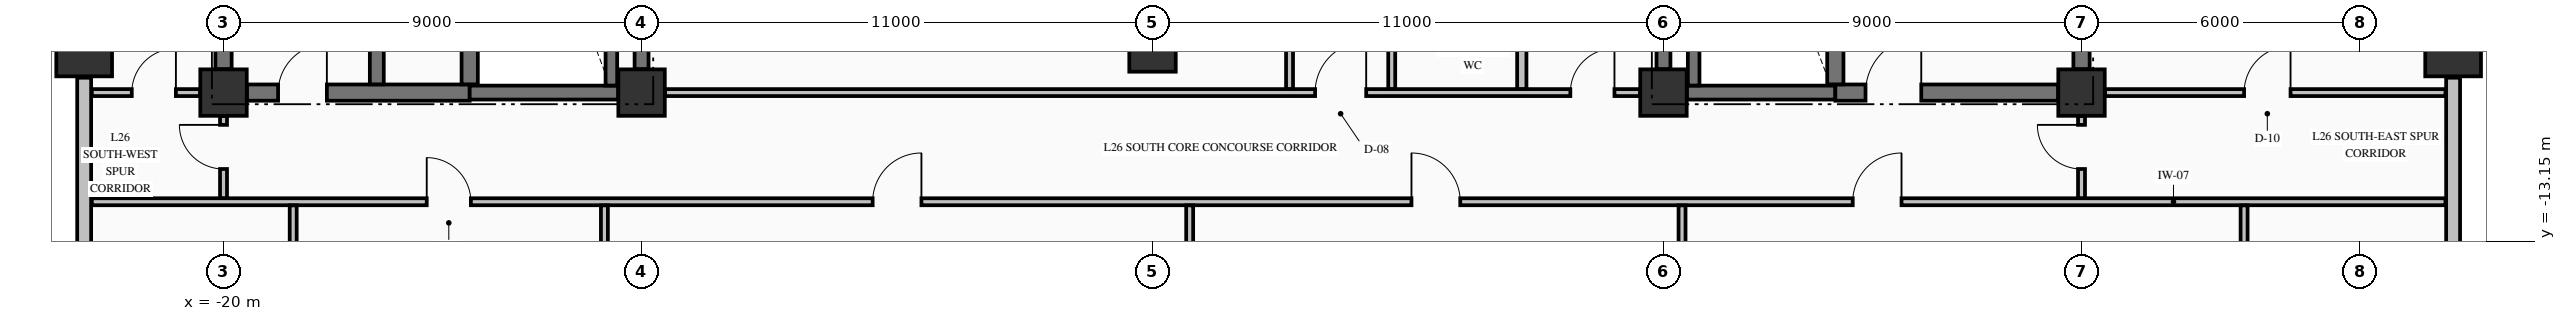
"""IFC4 building model, lengths in metres.
Left out: names, types, materials, properties, quantities, classifications, styles, units other than length and angle.
Written with IfcOpenShell. Run it as: python <this file> out.ifc"""

import sys

from ifc_helpers import new_model, si_unit, direction, frame, frame_2d, origin, origin_2d, place, context, subcontext, project, spatial, rectangle, extrude, element, fill, save


model = new_model("IFC4")
c1 = context("Model", 3, precision=1e-05, world=origin(), true_north=direction((0.0, 1.0)))
c2 = subcontext(c1, "Body", "Model", "MODEL_VIEW")
j1 = project(units=[si_unit("LENGTHUNIT", "METRE"), si_unit("PLANEANGLEUNIT", "RADIAN")], contexts=[c1])
p1 = place(None, origin())
s1 = spatial("IfcSite", under=j1, at=p1, CompositionType="ELEMENT")
p2 = place(p1, origin())
s2 = spatial("IfcBuilding", under=s1, at=p2, CompositionType="ELEMENT")
p3 = place(p2, frame((0.0, 0.0, 105.64)))
s3 = spatial("IfcBuildingStorey", under=s2, at=p3, CompositionType="ELEMENT", Elevation=105.64)
for number, where, z_axis, x_axis in (
    (1, (-23.0, -9.0, -0.25), (0.0, 0.0, 1.0), (1.0, 0.0, 0.0)),
    (2, (28.0, -9.0, -0.25), (0.0, 0.0, 1.0), (1.0, 0.0, 0.0)),
):
    element("IfcColumn", number, at=place(p3, frame(where, z_axis=z_axis, x_axis=x_axis)), inside=s3, PredefinedType="COLUMN", context=c2, shape_type="SweptSolid", body=[
        extrude(rectangle(XDim=1.2, YDim=1.2, at=origin_2d()), origin(), (0.0, 0.0, 1.0), 3.57),
    ])
for number, where, z_axis, x_axis in (
    (3, (-20.0, -9.95, -0.25), (0.0, 0.0, 1.0), (1.0, 0.0, 0.0)),
    (4, (-11.0, -9.95, -0.25), (0.0, 0.0, 1.0), (1.0, 0.0, 0.0)),
    (5, (11.0, -9.95, -0.25), (0.0, 0.0, 1.0), (1.0, 0.0, 0.0)),
    (6, (20.0, -9.95, -0.25), (0.0, 0.0, 1.0), (1.0, 0.0, 0.0)),
    (7, (0.0, -9.0, -0.25), (0.0, 0.0, 1.0), (1.0, 0.0, 0.0)),
):
    element("IfcColumn", number, at=place(p3, frame(where, z_axis=z_axis, x_axis=x_axis)), inside=s3, PredefinedType="COLUMN", context=c2, shape_type="SweptSolid", body=[
        extrude(rectangle(XDim=1.0, YDim=1.0, at=origin_2d()), origin(), (0.0, 0.0, 1.0), 3.57),
    ])
for number, where, z_axis, x_axis in (
    (8, (28.0, -20.37, 0.0), (0.0, 0.0, 1.0), (0.0, 1.0, 0.0)),
    (9, (-23.0, -9.63, 0.0), (0.0, 0.0, 1.0), (0.0, -1.0, 0.0)),
):
    element("IfcWall", number, at=place(p3, frame(where, z_axis=z_axis, x_axis=x_axis)), inside=s3, PredefinedType="STANDARD", context=c2, shape_type="SweptSolid", body=[
        extrude(rectangle(XDim=10.74, YDim=0.3, at=frame_2d((5.37, 0.0))), origin(), (0.0, 0.0, 1.0), 2.712),
    ])
p4 = place(p3, frame((-19.496, -9.95, 0.0), z_axis=(0.0, 0.0, 1.0), x_axis=(1.0, 0.0, 0.0)))
e10 = element("IfcWall", 10, at=p4, inside=s3, PredefinedType="SHEAR", context=c2, shape_type="SweptSolid", body=[
    extrude(rectangle(XDim=4.796, YDim=0.35, at=frame_2d((2.398, 0.0))), origin(), (0.0, 0.0, 1.0), 3.32),
])
p5 = place(p4, frame((0.671, 0.0, 0.0)))
e11 = element("IfcOpeningElement", 11, at=p5, cuts=e10, PredefinedType="OPENING", context=c2, shape_type="SweptSolid", body=[
    extrude(rectangle(XDim=1.05, YDim=2.15, at=frame_2d((0.525, 1.075))), frame((0.0, 0.185, 0.0), z_axis=(0.0, -1.0, 0.0), x_axis=(1.0, 0.0, 0.0)), (0.0, 0.0, 1.0), 0.37),
])
for number, where, z_axis, x_axis in (
    (12, (-14.7, -9.95, 0.0), (0.0, 0.0, 1.0), (1.0, 0.0, 0.0)),
    (13, (11.504, -9.95, 0.0), (0.0, 0.0, 1.0), (1.0, 0.0, 0.0)),
):
    element("IfcWall", number, at=place(p3, frame(where, z_axis=z_axis, x_axis=x_axis)), inside=s3, PredefinedType="SHEAR", context=c2, shape_type="SweptSolid", body=[
        extrude(rectangle(XDim=3.196, YDim=0.3, at=frame_2d((1.598, 0.0))), origin(), (0.0, 0.0, 1.0), 3.32),
    ])
p6 = place(p3, frame((14.7, -9.95, 0.0), z_axis=(0.0, 0.0, 1.0), x_axis=(1.0, 0.0, 0.0)))
e14 = element("IfcWall", 14, at=p6, inside=s3, PredefinedType="SHEAR", context=c2, shape_type="SweptSolid", body=[
    extrude(rectangle(XDim=4.796, YDim=0.35, at=frame_2d((2.398, 0.0))), origin(), (0.0, 0.0, 1.0), 3.32),
])
p7 = place(p6, frame((0.65, 0.0, 0.0)))
e15 = element("IfcOpeningElement", 15, at=p7, cuts=e14, PredefinedType="OPENING", context=c2, shape_type="SweptSolid", body=[
    extrude(rectangle(XDim=1.2, YDim=2.15, at=frame_2d((0.6, 1.075))), frame((0.0, 0.185, 0.0), z_axis=(0.0, -1.0, 0.0), x_axis=(1.0, 0.0, 0.0)), (0.0, 0.0, 1.0), 0.37),
])
p8 = place(p3, frame((-22.835, -12.3, 0.0), z_axis=(0.0, 0.0, 1.0), x_axis=(1.0, 0.0, 0.0)))
e16 = element("IfcWall", 16, at=p8, inside=s3, PredefinedType="PARTITIONING", context=c2, shape_type="SweptSolid", body=[
    extrude(rectangle(XDim=50.67, YDim=0.15, at=frame_2d((25.335, 0.0))), origin(), (0.0, 0.0, 1.0), 3.32),
])
p9 = place(p8, frame((7.21, 0.0, 0.0)))
e17 = element("IfcOpeningElement", 17, at=p9, cuts=e16, PredefinedType="OPENING", context=c2, shape_type="SweptSolid", body=[
    extrude(rectangle(XDim=0.95, YDim=2.15, at=frame_2d((0.475, 1.075))), frame((0.0, 0.085, 0.0), z_axis=(0.0, -1.0, 0.0), x_axis=(1.0, 0.0, 0.0)), (0.0, 0.0, 1.0), 0.17),
])
p10 = place(p8, frame((16.81, 0.0, 0.0)))
e18 = element("IfcOpeningElement", 18, at=p10, cuts=e16, PredefinedType="OPENING", context=c2, shape_type="SweptSolid", body=[
    extrude(rectangle(XDim=1.05, YDim=2.15, at=frame_2d((0.525, 1.075))), frame((0.0, 0.085, 0.0), z_axis=(0.0, -1.0, 0.0), x_axis=(1.0, 0.0, 0.0)), (0.0, 0.0, 1.0), 0.17),
])
p11 = place(p8, frame((28.41, 0.0, 0.0)))
e19 = element("IfcOpeningElement", 19, at=p11, cuts=e16, PredefinedType="OPENING", context=c2, shape_type="SweptSolid", body=[
    extrude(rectangle(XDim=1.05, YDim=2.15, at=frame_2d((0.525, 1.075))), frame((0.0, 0.085, 0.0), z_axis=(0.0, -1.0, 0.0), x_axis=(1.0, 0.0, 0.0)), (0.0, 0.0, 1.0), 0.17),
])
p12 = place(p8, frame((37.91, 0.0, 0.0)))
e20 = element("IfcOpeningElement", 20, at=p12, cuts=e16, PredefinedType="OPENING", context=c2, shape_type="SweptSolid", body=[
    extrude(rectangle(XDim=1.05, YDim=2.15, at=frame_2d((0.525, 1.075))), frame((0.0, 0.085, 0.0), z_axis=(0.0, -1.0, 0.0), x_axis=(1.0, 0.0, 0.0)), (0.0, 0.0, 1.0), 0.17),
])
p13 = place(p3, frame((-22.835, -9.95, 0.0), z_axis=(0.0, 0.0, 1.0), x_axis=(1.0, 0.0, 0.0)))
e21 = element("IfcWall", 21, at=p13, inside=s3, PredefinedType="PARTITIONING", context=c2, shape_type="SweptSolid", body=[
    extrude(rectangle(XDim=2.329, YDim=0.15, at=frame_2d((1.165, 0.0))), origin(), (0.0, 0.0, 1.0), 3.32),
])
p14 = place(p13, frame((0.86, 0.0, 0.0)))
e22 = element("IfcOpeningElement", 22, at=p14, cuts=e21, PredefinedType="OPENING", context=c2, shape_type="SweptSolid", body=[
    extrude(rectangle(XDim=0.95, YDim=2.15, at=frame_2d((0.475, 1.075))), frame((0.0, 0.085, 0.0), z_axis=(0.0, -1.0, 0.0), x_axis=(1.0, 0.0, 0.0)), (0.0, 0.0, 1.0), 0.17),
])
p15 = place(p3, frame((-10.494, -9.95, 0.0), z_axis=(0.0, 0.0, 1.0), x_axis=(1.0, 0.0, 0.0)))
e23 = element("IfcWall", 23, at=p15, inside=s3, PredefinedType="PARTITIONING", context=c2, shape_type="SweptSolid", body=[
    extrude(rectangle(XDim=20.988, YDim=0.15, at=frame_2d((10.494, 0.0))), origin(), (0.0, 0.0, 1.0), 3.32),
])
p16 = place(p15, frame((13.994, 0.0, 0.0)))
e24 = element("IfcOpeningElement", 24, at=p16, cuts=e23, PredefinedType="OPENING", context=c2, shape_type="SweptSolid", body=[
    extrude(rectangle(XDim=1.1, YDim=2.15, at=frame_2d((0.55, 1.075))), frame((0.0, 0.085, 0.0), z_axis=(0.0, -1.0, 0.0), x_axis=(1.0, 0.0, 0.0)), (0.0, 0.0, 1.0), 0.17),
])
p17 = place(p15, frame((19.489, 0.0, 0.0)))
e25 = element("IfcOpeningElement", 25, at=p17, cuts=e23, PredefinedType="OPENING", context=c2, shape_type="SweptSolid", body=[
    extrude(rectangle(XDim=0.95, YDim=2.15, at=frame_2d((0.475, 1.075))), frame((0.0, 0.085, 0.0), z_axis=(0.0, -1.0, 0.0), x_axis=(1.0, 0.0, 0.0)), (0.0, 0.0, 1.0), 0.17),
])
p18 = place(p3, frame((20.506, -9.95, 0.0), z_axis=(0.0, 0.0, 1.0), x_axis=(1.0, 0.0, 0.0)))
e26 = element("IfcWall", 26, at=p18, inside=s3, PredefinedType="PARTITIONING", context=c2, shape_type="SweptSolid", body=[
    extrude(rectangle(XDim=7.329, YDim=0.15, at=frame_2d((3.665, 0.0))), origin(), (0.0, 0.0, 1.0), 3.32),
])
p19 = place(p18, frame((2.994, 0.0, 0.0)))
e27 = element("IfcOpeningElement", 27, at=p19, cuts=e26, PredefinedType="OPENING", context=c2, shape_type="SweptSolid", body=[
    extrude(rectangle(XDim=1.0, YDim=2.15, at=frame_2d((0.5, 1.075))), frame((0.0, 0.085, 0.0), z_axis=(0.0, -1.0, 0.0), x_axis=(1.0, 0.0, 0.0)), (0.0, 0.0, 1.0), 0.17),
])
p20 = place(p3, frame((-20.0, -9.446, 0.0), z_axis=(0.0, 0.0, 1.0), x_axis=(0.0, 1.0, 0.0)))
e28 = element("IfcWall", 28, at=p20, inside=s3, PredefinedType="SHEAR", context=c2, shape_type="SweptSolid", body=[
    extrude(rectangle(XDim=8.942, YDim=0.35, at=frame_2d((4.471, 0.0))), origin(), (0.0, 0.0, 1.0), 3.32),
])
p21 = place(p3, frame((-16.7, -9.773, 0.0), z_axis=(0.0, 0.0, 1.0), x_axis=(0.0, 1.0, 0.0)))
e29 = element("IfcWall", 29, at=p21, inside=s3, PredefinedType="SHEAR", context=c2, shape_type="SweptSolid", body=[
    extrude(rectangle(XDim=9.371, YDim=0.3, at=frame_2d((4.686, 0.0))), origin(), (0.0, 0.0, 1.0), 3.32),
])
p22 = place(p3, frame((-14.7, -9.773, 0.0), z_axis=(0.0, 0.0, 1.0), x_axis=(0.0, 1.0, 0.0)))
e30 = element("IfcWall", 30, at=p22, inside=s3, PredefinedType="SHEAR", context=c2, shape_type="SweptSolid", body=[
    extrude(rectangle(XDim=9.371, YDim=0.35, at=frame_2d((4.686, 0.0))), origin(), (0.0, 0.0, 1.0), 3.32),
])
p23 = place(p3, frame((-11.65, -9.798, 0.0), z_axis=(0.0, 0.0, 1.0), x_axis=(0.0, 1.0, 0.0)))
e31 = element("IfcWall", 31, at=p23, inside=s3, PredefinedType="SOLIDWALL", context=c2, shape_type="SweptSolid", body=[
    extrude(rectangle(XDim=9.396, YDim=0.25, at=frame_2d((4.698, 0.0))), origin(), (0.0, 0.0, 1.0), 3.32),
])
for number, where, z_axis, x_axis in (
    (32, (-11.0, -9.446, 0.0), (0.0, 0.0, 1.0), (0.0, 1.0, 0.0)),
    (33, (11.0, -9.446, 0.0), (0.0, 0.0, 1.0), (0.0, 1.0, 0.0)),
):
    element("IfcWall", number, at=place(p3, frame(where, z_axis=z_axis, x_axis=x_axis)), inside=s3, PredefinedType="SHEAR", context=c2, shape_type="SweptSolid", body=[
        extrude(rectangle(XDim=8.942, YDim=0.3, at=frame_2d((4.471, 0.0))), origin(), (0.0, 0.0, 1.0), 3.32),
    ])
p24 = place(p3, frame((11.65, -9.798, 0.0), z_axis=(0.0, 0.0, 1.0), x_axis=(0.0, 1.0, 0.0)))
e34 = element("IfcWall", 34, at=p24, inside=s3, PredefinedType="SOLIDWALL", context=c2, shape_type="SweptSolid", body=[
    extrude(rectangle(XDim=9.396, YDim=0.25, at=frame_2d((4.698, 0.0))), origin(), (0.0, 0.0, 1.0), 3.32),
])
p25 = place(p3, frame((14.7, -9.773, 0.0), z_axis=(0.0, 0.0, 1.0), x_axis=(0.0, 1.0, 0.0)))
e35 = element("IfcWall", 35, at=p25, inside=s3, PredefinedType="SHEAR", context=c2, shape_type="SweptSolid", body=[
    extrude(rectangle(XDim=9.371, YDim=0.35, at=frame_2d((4.686, 0.0))), origin(), (0.0, 0.0, 1.0), 3.32),
])
p26 = place(p3, frame((20.0, -9.446, 0.0), z_axis=(0.0, 0.0, 1.0), x_axis=(0.0, 1.0, 0.0)))
e36 = element("IfcWall", 36, at=p26, inside=s3, PredefinedType="SHEAR", context=c2, shape_type="SweptSolid", body=[
    extrude(rectangle(XDim=2.269, YDim=0.35, at=frame_2d((1.135, 0.0))), origin(), (0.0, 0.0, 1.0), 3.32),
])
p27 = place(p3, frame((-20.0, -12.222, 0.0), z_axis=(0.0, 0.0, 1.0), x_axis=(0.0, 1.0, 0.0)))
e37 = element("IfcWall", 37, at=p27, inside=s3, PredefinedType="PARTITIONING", context=c2, shape_type="SweptSolid", body=[
    extrude(rectangle(XDim=1.766, YDim=0.15, at=frame_2d((0.883, 0.0))), origin(), (0.0, 0.0, 1.0), 2.81),
])
p28 = place(p27, frame((0.627, 0.0, 0.0)))
e38 = element("IfcOpeningElement", 38, at=p28, cuts=e37, PredefinedType="OPENING", context=c2, shape_type="SweptSolid", body=[
    extrude(rectangle(XDim=0.95, YDim=2.15, at=frame_2d((0.475, 1.075))), frame((0.0, 0.085, 0.0), z_axis=(0.0, -1.0, 0.0), x_axis=(1.0, 0.0, 0.0)), (0.0, 0.0, 1.0), 0.17),
])
p29 = place(p3, frame((-18.5, -20.394, 0.0), z_axis=(0.0, 0.0, 1.0), x_axis=(0.0, 1.0, 0.0)))
e39 = element("IfcWall", 39, at=p29, inside=s3, PredefinedType="PARTITIONING", context=c2, shape_type="SweptSolid", body=[
    extrude(rectangle(XDim=8.016, YDim=0.15, at=frame_2d((4.008, 0.0))), origin(), (0.0, 0.0, 1.0), 3.32),
])
for number, where, z_axis, x_axis in (
    (40, (-11.8, -25.335, 0.0), (0.0, 0.0, 1.0), (0.0, 1.0, 0.0)),
    (41, (0.8, -25.335, 0.0), (0.0, 0.0, 1.0), (0.0, 1.0, 0.0)),
):
    element("IfcWall", number, at=place(p3, frame(where, z_axis=z_axis, x_axis=x_axis)), inside=s3, PredefinedType="PARTITIONING", context=c2, shape_type="SweptSolid", body=[
        extrude(rectangle(XDim=12.957, YDim=0.15, at=frame_2d((6.479, 0.0))), origin(), (0.0, 0.0, 1.0), 3.32),
    ])
p30 = place(p3, frame((2.95, -9.872, 0.0), z_axis=(0.0, 0.0, 1.0), x_axis=(0.0, 1.0, 0.0)))
e42 = element("IfcWall", 42, at=p30, inside=s3, PredefinedType="PARTITIONING", context=c2, shape_type="SweptSolid", body=[
    extrude(rectangle(XDim=9.544, YDim=0.15, at=frame_2d((4.772, 0.0))), origin(), (0.0, 0.0, 1.0), 3.32),
])
p31 = place(p3, frame((5.15, -9.872, 0.0), z_axis=(0.0, 0.0, 1.0), x_axis=(0.0, 1.0, 0.0)))
e43 = element("IfcWall", 43, at=p31, inside=s3, PredefinedType="PARTITIONING", context=c2, shape_type="SweptSolid", body=[
    extrude(rectangle(XDim=4.919, YDim=0.15, at=frame_2d((2.459, 0.0))), origin(), (0.0, 0.0, 1.0), 3.32),
])
p32 = place(p31, frame((1.997, 0.0, 0.0)))
e44 = element("IfcOpeningElement", 44, at=p32, cuts=e43, PredefinedType="OPENING", context=c2, shape_type="SweptSolid", body=[
    extrude(rectangle(XDim=0.95, YDim=2.15, at=frame_2d((0.475, 1.075))), frame((0.0, 0.085, 0.0), z_axis=(0.0, -1.0, 0.0), x_axis=(1.0, 0.0, 0.0)), (0.0, 0.0, 1.0), 0.17),
])
p33 = place(p3, frame((7.95, -9.872, 0.0), z_axis=(0.0, 0.0, 1.0), x_axis=(0.0, 1.0, 0.0)))
e45 = element("IfcWall", 45, at=p33, inside=s3, PredefinedType="PARTITIONING", context=c2, shape_type="SweptSolid", body=[
    extrude(rectangle(XDim=4.919, YDim=0.2, at=frame_2d((2.459, 0.0))), origin(), (0.0, 0.0, 1.0), 3.32),
])
p34 = place(p3, frame((11.4, -24.894, 0.0), z_axis=(0.0, 0.0, 1.0), x_axis=(0.0, 1.0, 0.0)))
e46 = element("IfcWall", 46, at=p34, inside=s3, PredefinedType="PARTITIONING", context=c2, shape_type="SweptSolid", body=[
    extrude(rectangle(XDim=12.516, YDim=0.15, at=frame_2d((6.258, 0.0))), origin(), (0.0, 0.0, 1.0), 3.32),
])
p35 = place(p3, frame((20.0, -12.222, 0.0), z_axis=(0.0, 0.0, 1.0), x_axis=(0.0, 1.0, 0.0)))
e47 = element("IfcWall", 47, at=p35, inside=s3, PredefinedType="PARTITIONING", context=c2, shape_type="SweptSolid", body=[
    extrude(rectangle(XDim=1.766, YDim=0.15, at=frame_2d((0.883, 0.0))), origin(), (0.0, 0.0, 1.0), 2.81),
])
p36 = place(p35, frame((0.627, 0.0, 0.0)))
e48 = element("IfcOpeningElement", 48, at=p36, cuts=e47, PredefinedType="OPENING", context=c2, shape_type="SweptSolid", body=[
    extrude(rectangle(XDim=0.95, YDim=2.15, at=frame_2d((0.475, 1.075))), frame((0.0, 0.085, 0.0), z_axis=(0.0, -1.0, 0.0), x_axis=(1.0, 0.0, 0.0)), (0.0, 0.0, 1.0), 0.17),
])
p37 = place(p3, frame((23.5, -20.394, 0.0), z_axis=(0.0, 0.0, 1.0), x_axis=(0.0, 1.0, 0.0)))
e49 = element("IfcWall", 49, at=p37, inside=s3, PredefinedType="PARTITIONING", context=c2, shape_type="SweptSolid", body=[
    extrude(rectangle(XDim=8.016, YDim=0.15, at=frame_2d((4.008, 0.0))), origin(), (0.0, 0.0, 1.0), 3.32),
])
p38 = place(p5, origin())
e50 = element("IfcDoor", 50, at=p38, inside=s3, OperationType="SINGLE_SWING_RIGHT", PredefinedType="DOOR", context=c2, shape_type="SweptSolid", body=[
    extrude(rectangle(XDim=1.05, YDim=2.15, at=frame_2d((0.525, 1.075))), frame((0.0, 0.025, 0.0), z_axis=(0.0, -1.0, 0.0), x_axis=(1.0, 0.0, 0.0)), (0.0, 0.0, 1.0), 0.05),
])
fill(e11, e50)
p39 = place(p7, origin())
e51 = element("IfcDoor", 51, at=p39, inside=s3, OperationType="SINGLE_SWING_RIGHT", PredefinedType="DOOR", context=c2, shape_type="SweptSolid", body=[
    extrude(rectangle(XDim=1.2, YDim=2.15, at=frame_2d((0.6, 1.075))), frame((0.0, 0.025, 0.0), z_axis=(0.0, -1.0, 0.0), x_axis=(1.0, 0.0, 0.0)), (0.0, 0.0, 1.0), 0.05),
])
fill(e15, e51)
p40 = place(p16, origin())
e52 = element("IfcDoor", 52, at=p40, inside=s3, OperationType="SINGLE_SWING_RIGHT", PredefinedType="DOOR", context=c2, shape_type="SweptSolid", body=[
    extrude(rectangle(XDim=1.1, YDim=2.15, at=frame_2d((0.55, 1.075))), frame((0.0, 0.025, 0.0), z_axis=(0.0, -1.0, 0.0), x_axis=(1.0, 0.0, 0.0)), (0.0, 0.0, 1.0), 0.05),
])
fill(e24, e52)
p41 = place(p9, origin())
e53 = element("IfcDoor", 53, at=p41, inside=s3, OperationType="SINGLE_SWING_LEFT", PredefinedType="DOOR", context=c2, shape_type="SweptSolid", body=[
    extrude(rectangle(XDim=0.95, YDim=2.15, at=frame_2d((0.475, 1.075))), frame((0.0, 0.025, 0.0), z_axis=(0.0, -1.0, 0.0), x_axis=(1.0, 0.0, 0.0)), (0.0, 0.0, 1.0), 0.05),
])
fill(e17, e53)
p42 = place(p10, origin())
e54 = element("IfcDoor", 54, at=p42, inside=s3, OperationType="SINGLE_SWING_RIGHT", PredefinedType="DOOR", context=c2, shape_type="SweptSolid", body=[
    extrude(rectangle(XDim=1.05, YDim=2.15, at=frame_2d((0.525, 1.075))), frame((0.0, 0.025, 0.0), z_axis=(0.0, -1.0, 0.0), x_axis=(1.0, 0.0, 0.0)), (0.0, 0.0, 1.0), 0.05),
])
fill(e18, e54)
p43 = place(p11, origin())
e55 = element("IfcDoor", 55, at=p43, inside=s3, OperationType="SINGLE_SWING_LEFT", PredefinedType="DOOR", context=c2, shape_type="SweptSolid", body=[
    extrude(rectangle(XDim=1.05, YDim=2.15, at=frame_2d((0.525, 1.075))), frame((0.0, 0.025, 0.0), z_axis=(0.0, -1.0, 0.0), x_axis=(1.0, 0.0, 0.0)), (0.0, 0.0, 1.0), 0.05),
])
fill(e19, e55)
p44 = place(p12, origin())
e56 = element("IfcDoor", 56, at=p44, inside=s3, OperationType="SINGLE_SWING_RIGHT", PredefinedType="DOOR", context=c2, shape_type="SweptSolid", body=[
    extrude(rectangle(XDim=1.05, YDim=2.15, at=frame_2d((0.525, 1.075))), frame((0.0, 0.025, 0.0), z_axis=(0.0, -1.0, 0.0), x_axis=(1.0, 0.0, 0.0)), (0.0, 0.0, 1.0), 0.05),
])
fill(e20, e56)
p45 = place(p17, origin())
e57 = element("IfcDoor", 57, at=p45, inside=s3, OperationType="SINGLE_SWING_RIGHT", PredefinedType="DOOR", context=c2, shape_type="SweptSolid", body=[
    extrude(rectangle(XDim=0.95, YDim=2.15, at=frame_2d((0.475, 1.075))), frame((0.0, 0.025, 0.0), z_axis=(0.0, -1.0, 0.0), x_axis=(1.0, 0.0, 0.0)), (0.0, 0.0, 1.0), 0.05),
])
fill(e25, e57)
p46 = place(p28, origin())
e58 = element("IfcDoor", 58, at=p46, inside=s3, OperationType="SINGLE_SWING_RIGHT", PredefinedType="DOOR", context=c2, shape_type="SweptSolid", body=[
    extrude(rectangle(XDim=0.95, YDim=2.15, at=frame_2d((0.475, 1.075))), frame((0.0, 0.025, 0.0), z_axis=(0.0, -1.0, 0.0), x_axis=(1.0, 0.0, 0.0)), (0.0, 0.0, 1.0), 0.05),
])
fill(e38, e58)
p47 = place(p14, origin())
e59 = element("IfcDoor", 59, at=p47, inside=s3, OperationType="SINGLE_SWING_RIGHT", PredefinedType="DOOR", context=c2, shape_type="SweptSolid", body=[
    extrude(rectangle(XDim=0.95, YDim=2.15, at=frame_2d((0.475, 1.075))), frame((0.0, 0.025, 0.0), z_axis=(0.0, -1.0, 0.0), x_axis=(1.0, 0.0, 0.0)), (0.0, 0.0, 1.0), 0.05),
])
fill(e22, e59)
p48 = place(p36, origin())
e60 = element("IfcDoor", 60, at=p48, inside=s3, OperationType="SINGLE_SWING_RIGHT", PredefinedType="DOOR", context=c2, shape_type="SweptSolid", body=[
    extrude(rectangle(XDim=0.95, YDim=2.15, at=frame_2d((0.475, 1.075))), frame((0.0, 0.025, 0.0), z_axis=(0.0, -1.0, 0.0), x_axis=(1.0, 0.0, 0.0)), (0.0, 0.0, 1.0), 0.05),
])
fill(e48, e60)
p49 = place(p19, origin())
e61 = element("IfcDoor", 61, at=p49, inside=s3, OperationType="SINGLE_SWING_RIGHT", PredefinedType="DOOR", context=c2, shape_type="SweptSolid", body=[
    extrude(rectangle(XDim=1.0, YDim=2.15, at=frame_2d((0.5, 1.075))), frame((0.0, 0.025, 0.0), z_axis=(0.0, -1.0, 0.0), x_axis=(1.0, 0.0, 0.0)), (0.0, 0.0, 1.0), 0.05),
])
fill(e27, e61)
save(model, sys.argv[1])
